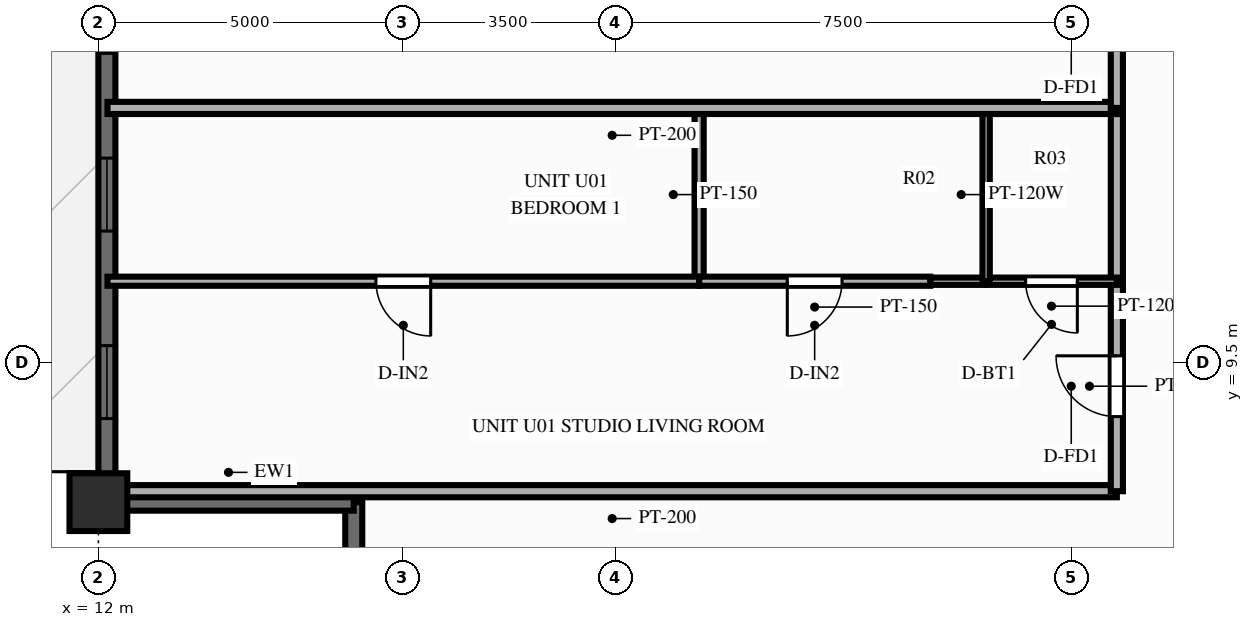
"""IFC4 building model, lengths in metres.
Left out: names, types, materials, properties, quantities, classifications, styles, units other than length and angle.
Written with IfcOpenShell. Run it as: python <this file> out.ifc"""

import sys

from ifc_helpers import new_model, si_unit, direction, frame, frame_2d, origin, origin_2d, place, context, subcontext, project, spatial, rectangle, extrude, source, transform, mapped, element, fill, save


model = new_model("IFC4")
c1 = context("Model", 3, precision=1e-05, world=origin(), true_north=direction((0.0, 1.0)))
c2 = subcontext(c1, "Body", "Model", "MODEL_VIEW")
j1 = project(units=[si_unit("LENGTHUNIT", "METRE"), si_unit("PLANEANGLEUNIT", "RADIAN")], contexts=[c1])
p1 = place(None, origin())
s1 = spatial("IfcSite", under=j1, at=p1, CompositionType="ELEMENT")
p2 = place(p1, origin())
s2 = spatial("IfcBuilding", under=s1, at=p2, CompositionType="ELEMENT")
p3 = place(p2, frame((0.0, 0.0, 92.85)))
s3 = spatial("IfcBuildingStorey", under=s2, at=p3, CompositionType="ELEMENT", Elevation=92.85)
m1 = source(origin(), c2, "Body", "SweptSolid", [
    extrude(rectangle(XDim=0.95, YDim=0.95, at=origin_2d()), origin(), (0.0, 0.0, 1.0), 3.0),
])
p4 = place(p3, frame((12.0, 7.2, 0.0), z_axis=(0.0, 0.0, 1.0), x_axis=(1.0, 0.0, 0.0)))
e1 = element("IfcColumn", 1, at=p4, inside=s3, PredefinedType="COLUMN", context=c2, shape_type="MappedRepresentation", body=[
    mapped(m1, transform((0.0, 0.0, 0.0), scale=1.0)),
])
p5 = place(p3, frame((12.14, 7.2, 0.0), z_axis=(0.0, 0.0, 1.0), x_axis=(0.0, 1.0, 0.0)))
e2 = element("IfcWall", 2, at=p5, inside=s3, PredefinedType="SOLIDWALL", context=c2, shape_type="SweptSolid", body=[
    extrude(rectangle(XDim=39.6, YDim=0.28, at=frame_2d((19.8, 0.0))), origin(), (0.0, 0.0, 1.0), 2.28),
])
p6 = place(p5, frame((1.374, 0.0, 0.25)))
e3 = element("IfcOpeningElement", 3, at=p6, cuts=e2, PredefinedType="OPENING", context=c2, shape_type="SweptSolid", body=[
    extrude(rectangle(XDim=1.2, YDim=1.5, at=frame_2d((0.6, 0.75))), frame((0.0, 0.152, 0.0), z_axis=(0.0, -1.0, 0.0), x_axis=(1.0, 0.0, 0.0)), (0.0, 0.0, 1.0), 0.304),
])
p7 = place(p5, frame((4.458, 0.0, 0.25)))
e4 = element("IfcOpeningElement", 4, at=p7, cuts=e2, PredefinedType="OPENING", context=c2, shape_type="SweptSolid", body=[
    extrude(rectangle(XDim=1.2, YDim=1.5, at=frame_2d((0.6, 0.75))), frame((0.0, 0.152, 0.0), z_axis=(0.0, -1.0, 0.0), x_axis=(1.0, 0.0, 0.0)), (0.0, 0.0, 1.0), 0.304),
])
p8 = place(p5, frame((7.382, 0.0, 0.25)))
e5 = element("IfcOpeningElement", 5, at=p8, cuts=e2, PredefinedType="OPENING", context=c2, shape_type="SweptSolid", body=[
    extrude(rectangle(XDim=1.2, YDim=1.5, at=frame_2d((0.6, 0.75))), frame((0.0, 0.152, 0.0), z_axis=(0.0, -1.0, 0.0), x_axis=(1.0, 0.0, 0.0)), (0.0, 0.0, 1.0), 0.304),
])
p9 = place(p5, frame((11.508, 0.0, 0.25)))
e6 = element("IfcOpeningElement", 6, at=p9, cuts=e2, PredefinedType="OPENING", context=c2, shape_type="SweptSolid", body=[
    extrude(rectangle(XDim=0.7, YDim=1.5, at=frame_2d((0.35, 0.75))), frame((0.0, 0.152, 0.0), z_axis=(0.0, -1.0, 0.0), x_axis=(1.0, 0.0, 0.0)), (0.0, 0.0, 1.0), 0.304),
])
p10 = place(p5, frame((13.409, 0.0, 0.25)))
e7 = element("IfcOpeningElement", 7, at=p10, cuts=e2, PredefinedType="OPENING", context=c2, shape_type="SweptSolid", body=[
    extrude(rectangle(XDim=1.2, YDim=1.5, at=frame_2d((0.6, 0.75))), frame((0.0, 0.152, 0.0), z_axis=(0.0, -1.0, 0.0), x_axis=(1.0, 0.0, 0.0)), (0.0, 0.0, 1.0), 0.304),
])
p11 = place(p5, frame((16.468, 0.0, 0.25)))
e8 = element("IfcOpeningElement", 8, at=p11, cuts=e2, PredefinedType="OPENING", context=c2, shape_type="SweptSolid", body=[
    extrude(rectangle(XDim=1.2, YDim=1.5, at=frame_2d((0.6, 0.75))), frame((0.0, 0.152, 0.0), z_axis=(0.0, -1.0, 0.0), x_axis=(1.0, 0.0, 0.0)), (0.0, 0.0, 1.0), 0.304),
])
p12 = place(p5, frame((19.2, 0.0, 0.25)))
e9 = element("IfcOpeningElement", 9, at=p12, cuts=e2, PredefinedType="OPENING", context=c2, shape_type="SweptSolid", body=[
    extrude(rectangle(XDim=1.2, YDim=1.5, at=frame_2d((0.6, 0.75))), frame((0.0, 0.152, 0.0), z_axis=(0.0, -1.0, 0.0), x_axis=(1.0, 0.0, 0.0)), (0.0, 0.0, 1.0), 0.304),
])
p13 = place(p5, frame((21.807, 0.0, 0.0)))
e10 = element("IfcOpeningElement", 10, at=p13, cuts=e2, PredefinedType="OPENING", context=c2, shape_type="SweptSolid", body=[
    extrude(rectangle(XDim=1.6, YDim=2.15, at=frame_2d((0.8, 1.075))), frame((0.0, 0.152, 0.0), z_axis=(0.0, -1.0, 0.0), x_axis=(1.0, 0.0, 0.0)), (0.0, 0.0, 1.0), 0.304),
])
p14 = place(p5, frame((25.159, 0.0, 0.25)))
e11 = element("IfcOpeningElement", 11, at=p14, cuts=e2, PredefinedType="OPENING", context=c2, shape_type="SweptSolid", body=[
    extrude(rectangle(XDim=1.2, YDim=1.5, at=frame_2d((0.6, 0.75))), frame((0.0, 0.152, 0.0), z_axis=(0.0, -1.0, 0.0), x_axis=(1.0, 0.0, 0.0)), (0.0, 0.0, 1.0), 0.304),
])
p15 = place(p5, frame((27.484, 0.0, 0.25)))
e12 = element("IfcOpeningElement", 12, at=p15, cuts=e2, PredefinedType="OPENING", context=c2, shape_type="SweptSolid", body=[
    extrude(rectangle(XDim=0.7, YDim=1.5, at=frame_2d((0.35, 0.75))), frame((0.0, 0.152, 0.0), z_axis=(0.0, -1.0, 0.0), x_axis=(1.0, 0.0, 0.0)), (0.0, 0.0, 1.0), 0.304),
])
p16 = place(p5, frame((31.111, 0.0, 0.25)))
e13 = element("IfcOpeningElement", 13, at=p16, cuts=e2, PredefinedType="OPENING", context=c2, shape_type="SweptSolid", body=[
    extrude(rectangle(XDim=1.2, YDim=1.5, at=frame_2d((0.6, 0.75))), frame((0.0, 0.152, 0.0), z_axis=(0.0, -1.0, 0.0), x_axis=(1.0, 0.0, 0.0)), (0.0, 0.0, 1.0), 0.304),
])
p17 = place(p5, frame((34.109, 0.0, 0.25)))
e14 = element("IfcOpeningElement", 14, at=p17, cuts=e2, PredefinedType="OPENING", context=c2, shape_type="SweptSolid", body=[
    extrude(rectangle(XDim=1.2, YDim=1.5, at=frame_2d((0.6, 0.75))), frame((0.0, 0.152, 0.0), z_axis=(0.0, -1.0, 0.0), x_axis=(1.0, 0.0, 0.0)), (0.0, 0.0, 1.0), 0.304),
])
p18 = place(p5, frame((37.101, 0.0, 0.25)))
e15 = element("IfcOpeningElement", 15, at=p18, cuts=e2, PredefinedType="OPENING", context=c2, shape_type="SweptSolid", body=[
    extrude(rectangle(XDim=1.2, YDim=1.5, at=frame_2d((0.6, 0.75))), frame((0.0, 0.152, 0.0), z_axis=(0.0, -1.0, 0.0), x_axis=(1.0, 0.0, 0.0)), (0.0, 0.0, 1.0), 0.304),
])
for number, where, z_axis, x_axis in (
    (16, (16.2, 3.08, 0.0), (0.0, 0.0, 1.0), (0.0, 1.0, 0.0)),
    (17, (12.08, 7.2, 0.0), (0.0, 0.0, 1.0), (1.0, 0.0, 0.0)),
):
    element("IfcWall", number, at=place(p3, frame(where, z_axis=z_axis, x_axis=x_axis)), inside=s3, PredefinedType="SOLIDWALL", context=c2, shape_type="SweptSolid", body=[
        extrude(rectangle(XDim=4.12, YDim=0.28, at=frame_2d((2.06, 0.0))), origin(), (0.0, 0.0, 1.0), 2.28),
    ])
p19 = place(p3, frame((28.75, 7.38, 0.0), z_axis=(0.0, 0.0, 1.0), x_axis=(-1.0, 0.0, 0.0)))
e18 = element("IfcWall", 18, at=p19, inside=s3, PredefinedType="PARTITIONING", context=c2, shape_type="SweptSolid", body=[
    extrude(rectangle(XDim=16.6, YDim=0.2, at=frame_2d((8.3, 0.0))), origin(), (0.0, 0.0, 1.0), 2.79),
])
p20 = place(p3, frame((28.75, 7.38, 0.0), z_axis=(0.0, 0.0, 1.0), x_axis=(0.0, 1.0, 0.0)))
e19 = element("IfcWall", 19, at=p20, inside=s3, PredefinedType="PARTITIONING", context=c2, shape_type="SweptSolid", body=[
    extrude(rectangle(XDim=3.454, YDim=0.2, at=frame_2d((1.727, 0.0))), origin(), (0.0, 0.0, 1.0), 2.79),
])
p21 = place(p20, frame((1.227, 0.0, 0.0)))
e20 = element("IfcOpeningElement", 20, at=p21, cuts=e19, PredefinedType="OPENING", context=c2, shape_type="SweptSolid", body=[
    extrude(rectangle(XDim=1.0, YDim=2.15, at=frame_2d((0.5, 1.075))), frame((0.0, 0.112, 0.0), z_axis=(0.0, -1.0, 0.0), x_axis=(1.0, 0.0, 0.0)), (0.0, 0.0, 1.0), 0.224),
])
p22 = place(p3, frame((28.75, 10.833, 0.0), z_axis=(0.0, 0.0, 1.0), x_axis=(0.0, 1.0, 0.0)))
e21 = element("IfcWall", 21, at=p22, inside=s3, PredefinedType="PARTITIONING", context=c2, shape_type="SweptSolid", body=[
    extrude(rectangle(XDim=2.85, YDim=0.2, at=frame_2d((1.425, 0.0))), origin(), (0.0, 0.0, 1.0), 2.79),
])
p23 = place(p3, frame((28.75, 10.833, 0.0), z_axis=(0.0, 0.0, 1.0), x_axis=(-1.0, 0.0, 0.0)))
e22 = element("IfcWall", 22, at=p23, inside=s3, PredefinedType="PARTITIONING", context=c2, shape_type="SweptSolid", body=[
    extrude(rectangle(XDim=2.15, YDim=0.12, at=frame_2d((1.075, 0.0))), origin(), (0.0, 0.0, 1.0), 2.79),
])
p24 = place(p23, frame((0.65, 0.0, 0.0)))
e23 = element("IfcOpeningElement", 23, at=p24, cuts=e22, PredefinedType="OPENING", context=c2, shape_type="SweptSolid", body=[
    extrude(rectangle(XDim=0.85, YDim=2.05, at=frame_2d((0.425, 1.025))), frame((0.0, 0.072, 0.0), z_axis=(0.0, -1.0, 0.0), x_axis=(1.0, 0.0, 0.0)), (0.0, 0.0, 1.0), 0.144),
])
p25 = place(p3, frame((26.6, 10.833, 0.0), z_axis=(0.0, 0.0, 1.0), x_axis=(-1.0, 0.0, 0.0)))
e24 = element("IfcWall", 24, at=p25, inside=s3, PredefinedType="PARTITIONING", context=c2, shape_type="SweptSolid", body=[
    extrude(rectangle(XDim=0.92, YDim=0.12, at=frame_2d((0.46, 0.0))), origin(), (0.0, 0.0, 1.0), 2.79),
])
p26 = place(p3, frame((26.6, 10.833, 0.0), z_axis=(0.0, 0.0, 1.0), x_axis=(0.0, 1.0, 0.0)))
e25 = element("IfcWall", 25, at=p26, inside=s3, PredefinedType="PARTITIONING", context=c2, shape_type="SweptSolid", body=[
    extrude(rectangle(XDim=2.85, YDim=0.12, at=frame_2d((1.425, 0.0))), origin(), (0.0, 0.0, 1.0), 2.79),
])
p27 = place(p3, frame((21.88, 10.833, 0.0), z_axis=(0.0, 0.0, 1.0), x_axis=(0.0, 1.0, 0.0)))
e26 = element("IfcWall", 26, at=p27, inside=s3, PredefinedType="PARTITIONING", context=c2, shape_type="SweptSolid", body=[
    extrude(rectangle(XDim=2.85, YDim=0.15, at=frame_2d((1.425, 0.0))), origin(), (0.0, 0.0, 1.0), 2.79),
])
p28 = place(p3, frame((25.68, 10.833, 0.0), z_axis=(0.0, 0.0, 1.0), x_axis=(-1.0, 0.0, 0.0)))
e27 = element("IfcWall", 27, at=p28, inside=s3, PredefinedType="PARTITIONING", context=c2, shape_type="SweptSolid", body=[
    extrude(rectangle(XDim=3.8, YDim=0.15, at=frame_2d((1.9, 0.0))), origin(), (0.0, 0.0, 1.0), 2.79),
])
p29 = place(p28, frame((1.45, 0.0, 0.0)))
e28 = element("IfcOpeningElement", 28, at=p29, cuts=e27, PredefinedType="OPENING", context=c2, shape_type="SweptSolid", body=[
    extrude(rectangle(XDim=0.9, YDim=2.1, at=frame_2d((0.45, 1.05))), frame((0.0, 0.087, 0.0), z_axis=(0.0, -1.0, 0.0), x_axis=(1.0, 0.0, 0.0)), (0.0, 0.0, 1.0), 0.174),
])
p30 = place(p3, frame((21.88, 10.833, 0.0), z_axis=(0.0, 0.0, 1.0), x_axis=(-1.0, 0.0, 0.0)))
e29 = element("IfcWall", 29, at=p30, inside=s3, PredefinedType="PARTITIONING", context=c2, shape_type="SweptSolid", body=[
    extrude(rectangle(XDim=9.73, YDim=0.15, at=frame_2d((4.865, 0.0))), origin(), (0.0, 0.0, 1.0), 2.79),
])
p31 = place(p30, frame((4.415, 0.0, 0.0)))
e30 = element("IfcOpeningElement", 30, at=p31, cuts=e29, PredefinedType="OPENING", context=c2, shape_type="SweptSolid", body=[
    extrude(rectangle(XDim=0.9, YDim=2.1, at=frame_2d((0.45, 1.05))), frame((0.0, 0.087, 0.0), z_axis=(0.0, -1.0, 0.0), x_axis=(1.0, 0.0, 0.0)), (0.0, 0.0, 1.0), 0.174),
])
p32 = place(p3, frame((28.75, 13.684, 0.0), z_axis=(0.0, 0.0, 1.0), x_axis=(-1.0, 0.0, 0.0)))
e31 = element("IfcWall", 31, at=p32, inside=s3, PredefinedType="PARTITIONING", context=c2, shape_type="SweptSolid", body=[
    extrude(rectangle(XDim=16.6, YDim=0.2, at=frame_2d((8.3, 0.0))), origin(), (0.0, 0.0, 1.0), 2.79),
])
p33 = place(p3, frame((28.75, 13.684, 0.0), z_axis=(0.0, 0.0, 1.0), x_axis=(0.0, 1.0, 0.0)))
e32 = element("IfcWall", 32, at=p33, inside=s3, PredefinedType="PARTITIONING", context=c2, shape_type="SweptSolid", body=[
    extrude(rectangle(XDim=2.996, YDim=0.2, at=frame_2d((1.498, 0.0))), origin(), (0.0, 0.0, 1.0), 2.79),
])
p34 = place(p33, frame((0.998, 0.0, 0.0)))
e33 = element("IfcOpeningElement", 33, at=p34, cuts=e32, PredefinedType="OPENING", context=c2, shape_type="SweptSolid", body=[
    extrude(rectangle(XDim=1.0, YDim=2.15, at=frame_2d((0.5, 1.075))), frame((0.0, 0.112, 0.0), z_axis=(0.0, -1.0, 0.0), x_axis=(1.0, 0.0, 0.0)), (0.0, 0.0, 1.0), 0.224),
])
m2 = source(origin(), c2, "Body", "SweptSolid", [
    extrude(rectangle(XDim=1.2, YDim=1.5, at=frame_2d((0.6, 0.75))), frame((0.0, 0.03, 0.0), z_axis=(0.0, -1.0, 0.0), x_axis=(1.0, 0.0, 0.0)), (0.0, 0.0, 1.0), 0.06),
])
p35 = place(p6, origin())
e34 = element("IfcWindow", 34, at=p35, inside=s3, PartitioningType="SINGLE_PANEL", PredefinedType="WINDOW", context=c2, shape_type="MappedRepresentation", body=[
    mapped(m2, transform((0.0, 0.0, 0.0), scale=1.0)),
])
fill(e3, e34)
p36 = place(p7, origin())
e35 = element("IfcWindow", 35, at=p36, inside=s3, PartitioningType="SINGLE_PANEL", PredefinedType="WINDOW", context=c2, shape_type="MappedRepresentation", body=[
    mapped(m2, transform((0.0, 0.0, 0.0), scale=1.0)),
])
fill(e4, e35)
p37 = place(p8, origin())
e36 = element("IfcWindow", 36, at=p37, inside=s3, PartitioningType="SINGLE_PANEL", PredefinedType="WINDOW", context=c2, shape_type="MappedRepresentation", body=[
    mapped(m2, transform((0.0, 0.0, 0.0), scale=1.0)),
])
fill(e5, e36)
m3 = source(origin(), c2, "Body", "SweptSolid", [
    extrude(rectangle(XDim=1.0, YDim=2.15, at=frame_2d((0.5, 1.075))), frame((0.0, 0.025, 0.0), z_axis=(0.0, -1.0, 0.0), x_axis=(1.0, 0.0, 0.0)), (0.0, 0.0, 1.0), 0.05),
])
p38 = place(p21, origin())
e37 = element("IfcDoor", 37, at=p38, inside=s3, OperationType="SINGLE_SWING_RIGHT", PredefinedType="DOOR", context=c2, shape_type="MappedRepresentation", body=[
    mapped(m3, transform((0.0, 0.0, 0.0), scale=1.0)),
])
fill(e20, e37)
m4 = source(origin(), c2, "Body", "SweptSolid", [
    extrude(rectangle(XDim=0.85, YDim=2.05, at=frame_2d((0.425, 1.025))), frame((0.0, 0.025, 0.0), z_axis=(0.0, -1.0, 0.0), x_axis=(1.0, 0.0, 0.0)), (0.0, 0.0, 1.0), 0.05),
])
p39 = place(p24, origin())
e38 = element("IfcDoor", 38, at=p39, inside=s3, OperationType="SINGLE_SWING_LEFT", PredefinedType="DOOR", context=c2, shape_type="MappedRepresentation", body=[
    mapped(m4, transform((0.0, 0.0, 0.0), scale=1.0)),
])
fill(e23, e38)
m5 = source(origin(), c2, "Body", "SweptSolid", [
    extrude(rectangle(XDim=0.9, YDim=2.1, at=frame_2d((0.45, 1.05))), frame((0.0, 0.025, 0.0), z_axis=(0.0, -1.0, 0.0), x_axis=(1.0, 0.0, 0.0)), (0.0, 0.0, 1.0), 0.05),
])
p40 = place(p29, origin())
e39 = element("IfcDoor", 39, at=p40, inside=s3, OperationType="SINGLE_SWING_RIGHT", PredefinedType="DOOR", context=c2, shape_type="MappedRepresentation", body=[
    mapped(m5, transform((0.0, 0.0, 0.0), scale=1.0)),
])
fill(e28, e39)
p41 = place(p31, origin())
e40 = element("IfcDoor", 40, at=p41, inside=s3, OperationType="SINGLE_SWING_LEFT", PredefinedType="DOOR", context=c2, shape_type="MappedRepresentation", body=[
    mapped(m5, transform((0.0, 0.0, 0.0), scale=1.0)),
])
fill(e30, e40)
save(model, sys.argv[1])
